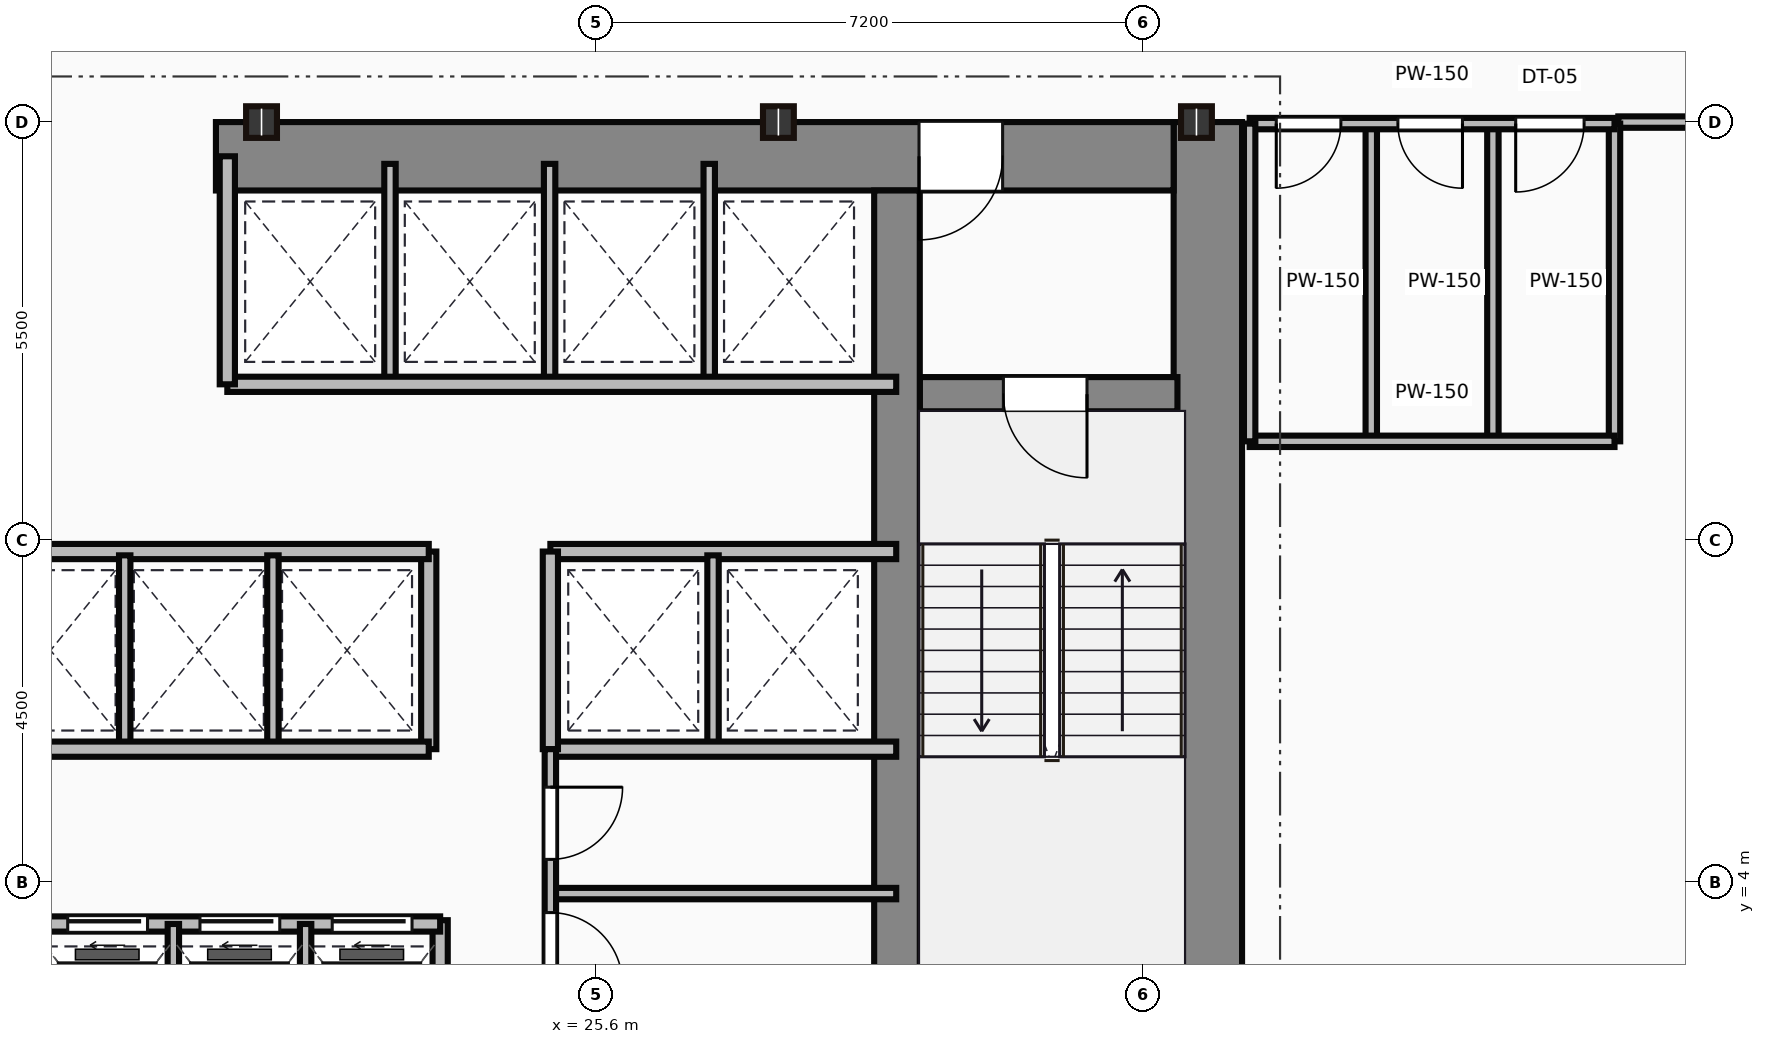
"""IFC4 building model, lengths in metres.
Left out: names, types, materials, properties, quantities, classifications, styles, units other than length and angle.
Written with IfcOpenShell. Run it as: python <this file> out.ifc"""

import sys

from ifc_helpers import new_model, si_unit, direction, frame, frame_2d, origin, origin_2d, place, context, subcontext, project, spatial, rectangle, i_section, extrude, source, transform, mapped, element, fill, save


model = new_model("IFC4")
c1 = context("Model", 3, precision=1e-05, world=origin(), true_north=direction((0.0, 1.0)))
c2 = subcontext(c1, "Body", "Model", "MODEL_VIEW")
j1 = project(units=[si_unit("LENGTHUNIT", "METRE"), si_unit("PLANEANGLEUNIT", "RADIAN")], contexts=[c1])
p1 = place(None, origin())
s1 = spatial("IfcSite", under=j1, at=p1, CompositionType="ELEMENT")
p2 = place(p1, origin())
s2 = spatial("IfcBuilding", under=s1, at=p2, CompositionType="ELEMENT")
p3 = place(p2, frame((0.0, 0.0, 47.1)))
s3 = spatial("IfcBuildingStorey", under=s2, at=p3, CompositionType="ELEMENT", Elevation=47.1)
m1 = source(origin(), c2, "Body", "SweptSolid", [
    extrude(rectangle(XDim=13.1, YDim=0.9, at=frame_2d((6.55, 0.0))), origin(), (0.0, 0.0, 1.0), 3.65),
])
p4 = place(p3, frame((33.65, 0.9, 0.0), z_axis=(0.0, 0.0, 1.0), x_axis=(0.0, 1.0, 0.0)))
e1 = element("IfcWall", 1, at=p4, inside=s3, PredefinedType="SHEAR", context=c2, shape_type="MappedRepresentation", body=[
    mapped(m1, transform((0.0, 0.0, 0.0))),
])
m2 = source(origin(), c2, "Body", "SweptSolid", [
    extrude(rectangle(XDim=12.6, YDim=0.9, at=frame_2d((6.3, 0.0))), origin(), (0.0, 0.0, 1.0), 3.65),
])
p5 = place(p3, frame((20.6, 13.55, 0.0), z_axis=(0.0, 0.0, 1.0), x_axis=(1.0, 0.0, 0.0)))
e2 = element("IfcWall", 2, at=p5, inside=s3, PredefinedType="SHEAR", context=c2, shape_type="MappedRepresentation", body=[
    mapped(m2, transform((0.0, 0.0, 0.0))),
])
p6 = place(p5, frame((9.25, 0.0, 0.0)))
e3 = element("IfcOpeningElement", 3, at=p6, cuts=e2, PredefinedType="OPENING", context=c2, shape_type="SweptSolid", body=[
    extrude(rectangle(XDim=1.1, YDim=2.15, at=frame_2d((0.55, 1.075))), frame((0.0, 0.46, 0.0), z_axis=(0.0, -1.0, 0.0), x_axis=(1.0, 0.0, 0.0)), (0.0, 0.0, 1.0), 0.92),
])
m3 = source(origin(), c2, "Body", "SweptSolid", [
    extrude(rectangle(XDim=12.2, YDim=0.6, at=frame_2d((6.1, 0.0))), origin(), (0.0, 0.0, 1.0), 3.65),
])
p7 = place(p3, frame((29.56, 0.9, 0.0), z_axis=(0.0, 0.0, 1.0), x_axis=(0.0, 1.0, 0.0)))
e4 = element("IfcWall", 4, at=p7, inside=s3, PredefinedType="SHEAR", context=c2, shape_type="MappedRepresentation", body=[
    mapped(m3, transform((0.0, 0.0, 0.0))),
])
m4 = source(origin(), c2, "Body", "SweptSolid", [
    extrude(rectangle(XDim=3.39, YDim=0.45, at=frame_2d((1.695, 0.0))), origin(), (0.0, 0.0, 1.0), 3.65),
])
p8 = place(p3, frame((29.86, 10.42, 0.0), z_axis=(0.0, 0.0, 1.0), x_axis=(1.0, 0.0, 0.0)))
e5 = element("IfcWall", 5, at=p8, inside=s3, PredefinedType="SHEAR", context=c2, shape_type="MappedRepresentation", body=[
    mapped(m4, transform((0.0, 0.0, 0.0))),
])
p9 = place(p8, frame((1.1, 0.0, 0.0)))
e6 = element("IfcOpeningElement", 6, at=p9, cuts=e5, PredefinedType="OPENING", context=c2, shape_type="SweptSolid", body=[
    extrude(rectangle(XDim=1.1, YDim=2.15, at=frame_2d((0.55, 1.075))), frame((0.0, 0.235, 0.0), z_axis=(0.0, -1.0, 0.0), x_axis=(1.0, 0.0, 0.0)), (0.0, 0.0, 1.0), 0.47),
])
m5 = source(origin(), c2, "Body", "SweptSolid", [
    extrude(i_section(OverallWidth=0.406, OverallDepth=0.416, WebThickness=0.03, FlangeThickness=0.048, at=origin_2d()), origin(), (0.0, 0.0, 1.0), 3.65),
])
for number, where, z_axis, x_axis in (
    (7, (21.2, 14.0, 0.0), (0.0, 0.0, 1.0), (1.0, 0.0, 0.0)),
    (8, (28.0, 14.0, 0.0), (0.0, 0.0, 1.0), (1.0, 0.0, 0.0)),
    (9, (33.5, 14.0, 0.0), (0.0, 0.0, 1.0), (1.0, 0.0, 0.0)),
):
    element("IfcColumn", number, at=place(p3, frame(where, z_axis=z_axis, x_axis=x_axis)), inside=s3, PredefinedType="COLUMN", context=c2, shape_type="MappedRepresentation", body=[
        mapped(m5, transform((0.0, 0.0, 0.0))),
    ])
m6 = source(origin(), c2, "Body", "SweptSolid", [
    extrude(rectangle(XDim=10.5, YDim=0.2, at=frame_2d((5.25, 0.0))), origin(), (0.0, 0.0, 1.0), 3.4),
])
p10 = place(p3, frame((13.05, 3.45, 0.0), z_axis=(0.0, 0.0, 1.0), x_axis=(1.0, 0.0, 0.0)))
e10 = element("IfcWall", 10, at=p10, inside=s3, PredefinedType="PARTITIONING", context=c2, shape_type="MappedRepresentation", body=[
    mapped(m6, transform((0.0, 0.0, 0.0))),
])
p11 = place(p10, frame((0.38, 0.0, 0.0)))
e11 = element("IfcOpeningElement", 11, at=p11, cuts=e10, PredefinedType="OPENING", context=c2, shape_type="SweptSolid", body=[
    extrude(rectangle(XDim=1.05, YDim=2.15, at=frame_2d((0.525, 1.075))), frame((0.0, 0.11, 0.0), z_axis=(0.0, -1.0, 0.0), x_axis=(1.0, 0.0, 0.0)), (0.0, 0.0, 1.0), 0.22),
])
p12 = place(p10, frame((2.12, 0.0, 0.0)))
e12 = element("IfcOpeningElement", 12, at=p12, cuts=e10, PredefinedType="OPENING", context=c2, shape_type="SweptSolid", body=[
    extrude(rectangle(XDim=1.05, YDim=2.15, at=frame_2d((0.525, 1.075))), frame((0.0, 0.11, 0.0), z_axis=(0.0, -1.0, 0.0), x_axis=(1.0, 0.0, 0.0)), (0.0, 0.0, 1.0), 0.22),
])
p13 = place(p10, frame((3.86, 0.0, 0.0)))
e13 = element("IfcOpeningElement", 13, at=p13, cuts=e10, PredefinedType="OPENING", context=c2, shape_type="SweptSolid", body=[
    extrude(rectangle(XDim=1.05, YDim=2.15, at=frame_2d((0.525, 1.075))), frame((0.0, 0.11, 0.0), z_axis=(0.0, -1.0, 0.0), x_axis=(1.0, 0.0, 0.0)), (0.0, 0.0, 1.0), 0.22),
])
p14 = place(p10, frame((5.6, 0.0, 0.0)))
e14 = element("IfcOpeningElement", 14, at=p14, cuts=e10, PredefinedType="OPENING", context=c2, shape_type="SweptSolid", body=[
    extrude(rectangle(XDim=1.05, YDim=2.15, at=frame_2d((0.525, 1.075))), frame((0.0, 0.11, 0.0), z_axis=(0.0, -1.0, 0.0), x_axis=(1.0, 0.0, 0.0)), (0.0, 0.0, 1.0), 0.22),
])
p15 = place(p10, frame((7.34, 0.0, 0.0)))
e15 = element("IfcOpeningElement", 15, at=p15, cuts=e10, PredefinedType="OPENING", context=c2, shape_type="SweptSolid", body=[
    extrude(rectangle(XDim=1.05, YDim=2.15, at=frame_2d((0.525, 1.075))), frame((0.0, 0.11, 0.0), z_axis=(0.0, -1.0, 0.0), x_axis=(1.0, 0.0, 0.0)), (0.0, 0.0, 1.0), 0.22),
])
p16 = place(p10, frame((9.08, 0.0, 0.0)))
e16 = element("IfcOpeningElement", 16, at=p16, cuts=e10, PredefinedType="OPENING", context=c2, shape_type="SweptSolid", body=[
    extrude(rectangle(XDim=1.05, YDim=2.15, at=frame_2d((0.525, 1.075))), frame((0.0, 0.11, 0.0), z_axis=(0.0, -1.0, 0.0), x_axis=(1.0, 0.0, 0.0)), (0.0, 0.0, 1.0), 0.22),
])
m7 = source(origin(), c2, "Body", "SweptSolid", [
    extrude(rectangle(XDim=2.65, YDim=0.2, at=frame_2d((1.325, 0.0))), origin(), (0.0, 0.0, 1.0), 3.4),
])
p17 = place(p3, frame((23.55, 0.85, 0.0), z_axis=(0.0, 0.0, 1.0), x_axis=(0.0, 1.0, 0.0)))
e17 = element("IfcWall", 17, at=p17, inside=s3, PredefinedType="PARTITIONING", context=c2, shape_type="MappedRepresentation", body=[
    mapped(m7, transform((0.0, 0.0, 0.0))),
])
m8 = source(origin(), c2, "Body", "SweptSolid", [
    extrude(rectangle(XDim=2.6, YDim=0.15, at=frame_2d((1.3, 0.0))), origin(), (0.0, 0.0, 1.0), 3.4),
])
for number, where, z_axis, x_axis in (
    (18, (20.04, 0.85, 0.0), (0.0, 0.0, 1.0), (0.0, 1.0, 0.0)),
    (19, (21.78, 0.85, 0.0), (0.0, 0.0, 1.0), (0.0, 1.0, 0.0)),
):
    element("IfcWall", number, at=place(p3, frame(where, z_axis=z_axis, x_axis=x_axis)), inside=s3, PredefinedType="PARTITIONING", context=c2, shape_type="MappedRepresentation", body=[
        mapped(m8, transform((0.0, 0.0, 0.0))),
    ])
m9 = source(origin(), c2, "Body", "SweptSolid", [
    extrude(rectangle(XDim=11.85, YDim=0.2, at=frame_2d((5.925, 0.0))), origin(), (0.0, 0.0, 1.0), 3.4),
])
for number, where, z_axis, x_axis in (
    (20, (11.55, 5.75, 0.0), (0.0, 0.0, 1.0), (1.0, 0.0, 0.0)),
    (21, (11.55, 8.35, 0.0), (0.0, 0.0, 1.0), (1.0, 0.0, 0.0)),
):
    element("IfcWall", number, at=place(p3, frame(where, z_axis=z_axis, x_axis=x_axis)), inside=s3, PredefinedType="PARTITIONING", context=c2, shape_type="MappedRepresentation", body=[
        mapped(m9, transform((0.0, 0.0, 0.0))),
    ])
m10 = source(origin(), c2, "Body", "SweptSolid", [
    extrude(rectangle(XDim=2.6, YDim=0.2, at=frame_2d((1.3, 0.0))), origin(), (0.0, 0.0, 1.0), 3.4),
])
p18 = place(p3, frame((23.4, 5.75, 0.0), z_axis=(0.0, 0.0, 1.0), x_axis=(0.0, 1.0, 0.0)))
e22 = element("IfcWall", 22, at=p18, inside=s3, PredefinedType="PARTITIONING", context=c2, shape_type="MappedRepresentation", body=[
    mapped(m10, transform((0.0, 0.0, 0.0))),
])
m11 = source(origin(), c2, "Body", "SweptSolid", [
    extrude(rectangle(XDim=2.5, YDim=0.15, at=frame_2d((1.25, 0.0))), origin(), (0.0, 0.0, 1.0), 3.4),
])
for number, where, z_axis, x_axis in (
    (23, (19.4, 5.8, 0.0), (0.0, 0.0, 1.0), (0.0, 1.0, 0.0)),
    (24, (21.35, 5.8, 0.0), (0.0, 0.0, 1.0), (0.0, 1.0, 0.0)),
):
    element("IfcWall", number, at=place(p3, frame(where, z_axis=z_axis, x_axis=x_axis)), inside=s3, PredefinedType="PARTITIONING", context=c2, shape_type="MappedRepresentation", body=[
        mapped(m11, transform((0.0, 0.0, 0.0))),
    ])
m12 = source(origin(), c2, "Body", "SweptSolid", [
    extrude(rectangle(XDim=8.8, YDim=0.2, at=frame_2d((4.4, 0.0))), origin(), (0.0, 0.0, 1.0), 3.4),
])
p19 = place(p3, frame((20.75, 10.55, 0.0), z_axis=(0.0, 0.0, 1.0), x_axis=(1.0, 0.0, 0.0)))
e25 = element("IfcWall", 25, at=p19, inside=s3, PredefinedType="PARTITIONING", context=c2, shape_type="MappedRepresentation", body=[
    mapped(m12, transform((0.0, 0.0, 0.0))),
])
m13 = source(origin(), c2, "Body", "SweptSolid", [
    extrude(rectangle(XDim=3.0, YDim=0.2, at=frame_2d((1.5, 0.0))), origin(), (0.0, 0.0, 1.0), 3.4),
])
p20 = place(p3, frame((20.75, 10.55, 0.0), z_axis=(0.0, 0.0, 1.0), x_axis=(0.0, 1.0, 0.0)))
e26 = element("IfcWall", 26, at=p20, inside=s3, PredefinedType="PARTITIONING", context=c2, shape_type="MappedRepresentation", body=[
    mapped(m13, transform((0.0, 0.0, 0.0))),
])
m14 = source(origin(), c2, "Body", "SweptSolid", [
    extrude(rectangle(XDim=2.85, YDim=0.15, at=frame_2d((1.425, 0.0))), origin(), (0.0, 0.0, 1.0), 3.4),
])
for number, where, z_axis, x_axis in (
    (27, (22.89, 10.6, 0.0), (0.0, 0.0, 1.0), (0.0, 1.0, 0.0)),
    (28, (24.99, 10.6, 0.0), (0.0, 0.0, 1.0), (0.0, 1.0, 0.0)),
    (29, (27.09, 10.6, 0.0), (0.0, 0.0, 1.0), (0.0, 1.0, 0.0)),
):
    element("IfcWall", number, at=place(p3, frame(where, z_axis=z_axis, x_axis=x_axis)), inside=s3, PredefinedType="PARTITIONING", context=c2, shape_type="MappedRepresentation", body=[
        mapped(m14, transform((0.0, 0.0, 0.0))),
    ])
m15 = source(origin(), c2, "Body", "SweptSolid", [
    extrude(rectangle(XDim=4.55, YDim=0.2, at=frame_2d((2.275, 0.0))), origin(), (0.0, 0.0, 1.0), 3.4),
])
for number, where, z_axis, x_axis in (
    (30, (25.0, 8.35, 0.0), (0.0, 0.0, 1.0), (1.0, 0.0, 0.0)),
    (31, (25.0, 5.75, 0.0), (0.0, 0.0, 1.0), (1.0, 0.0, 0.0)),
):
    element("IfcWall", number, at=place(p3, frame(where, z_axis=z_axis, x_axis=x_axis)), inside=s3, PredefinedType="PARTITIONING", context=c2, shape_type="MappedRepresentation", body=[
        mapped(m15, transform((0.0, 0.0, 0.0))),
    ])
p21 = place(p3, frame((25.0, 5.75, 0.0), z_axis=(0.0, 0.0, 1.0), x_axis=(0.0, 1.0, 0.0)))
e32 = element("IfcWall", 32, at=p21, inside=s3, PredefinedType="PARTITIONING", context=c2, shape_type="MappedRepresentation", body=[
    mapped(m10, transform((0.0, 0.0, 0.0))),
])
p22 = place(p3, frame((27.14, 5.8, 0.0), z_axis=(0.0, 0.0, 1.0), x_axis=(0.0, 1.0, 0.0)))
e33 = element("IfcWall", 33, at=p22, inside=s3, PredefinedType="PARTITIONING", context=c2, shape_type="MappedRepresentation", body=[
    mapped(m11, transform((0.0, 0.0, 0.0))),
])
m16 = source(origin(), c2, "Body", "SweptSolid", [
    extrude(rectangle(XDim=4.9, YDim=0.15, at=frame_2d((2.45, 0.0))), origin(), (0.0, 0.0, 1.0), 3.4),
])
p23 = place(p3, frame((25.0, 0.85, 0.0), z_axis=(0.0, 0.0, 1.0), x_axis=(0.0, 1.0, 0.0)))
e34 = element("IfcWall", 34, at=p23, inside=s3, PredefinedType="PARTITIONING", context=c2, shape_type="MappedRepresentation", body=[
    mapped(m16, transform((0.0, 0.0, 0.0))),
])
p24 = place(p23, frame((1.8, 0.0, 0.0)))
e35 = element("IfcOpeningElement", 35, at=p24, cuts=e34, PredefinedType="OPENING", context=c2, shape_type="SweptSolid", body=[
    extrude(rectangle(XDim=0.95, YDim=2.15, at=frame_2d((0.475, 1.075))), frame((0.0, 0.085, 0.0), z_axis=(0.0, -1.0, 0.0), x_axis=(1.0, 0.0, 0.0)), (0.0, 0.0, 1.0), 0.17),
])
p25 = place(p23, frame((3.45, 0.0, 0.0)))
e36 = element("IfcOpeningElement", 36, at=p25, cuts=e34, PredefinedType="OPENING", context=c2, shape_type="SweptSolid", body=[
    extrude(rectangle(XDim=0.95, YDim=2.15, at=frame_2d((0.475, 1.075))), frame((0.0, 0.085, 0.0), z_axis=(0.0, -1.0, 0.0), x_axis=(1.0, 0.0, 0.0)), (0.0, 0.0, 1.0), 0.17),
])
m17 = source(origin(), c2, "Body", "SweptSolid", [
    extrude(rectangle(XDim=4.55, YDim=0.15, at=frame_2d((2.275, 0.0))), origin(), (0.0, 0.0, 1.0), 3.4),
])
p26 = place(p3, frame((25.0, 3.85, 0.0), z_axis=(0.0, 0.0, 1.0), x_axis=(1.0, 0.0, 0.0)))
e37 = element("IfcWall", 37, at=p26, inside=s3, PredefinedType="PARTITIONING", context=c2, shape_type="MappedRepresentation", body=[
    mapped(m17, transform((0.0, 0.0, 0.0))),
])
m18 = source(origin(), c2, "Body", "SweptSolid", [
    extrude(rectangle(XDim=4.8, YDim=0.15, at=frame_2d((2.4, 0.0))), origin(), (0.0, 0.0, 1.0), 2.625),
])
p27 = place(p3, frame((34.2, 13.98, 0.0), z_axis=(0.0, 0.0, 1.0), x_axis=(1.0, 0.0, 0.0)))
e38 = element("IfcWall", 38, at=p27, inside=s3, PredefinedType="PARTITIONING", context=c2, shape_type="MappedRepresentation", body=[
    mapped(m18, transform((0.0, 0.0, 0.0))),
])
p28 = place(p27, frame((0.35, 0.0, 0.0)))
e39 = element("IfcOpeningElement", 39, at=p28, cuts=e38, PredefinedType="OPENING", context=c2, shape_type="SweptSolid", body=[
    extrude(rectangle(XDim=0.85, YDim=2.1, at=frame_2d((0.425, 1.05))), frame((0.0, 0.085, 0.0), z_axis=(0.0, -1.0, 0.0), x_axis=(1.0, 0.0, 0.0)), (0.0, 0.0, 1.0), 0.17),
])
p29 = place(p27, frame((1.95, 0.0, 0.0)))
e40 = element("IfcOpeningElement", 40, at=p29, cuts=e38, PredefinedType="OPENING", context=c2, shape_type="SweptSolid", body=[
    extrude(rectangle(XDim=0.85, YDim=2.1, at=frame_2d((0.425, 1.05))), frame((0.0, 0.085, 0.0), z_axis=(0.0, -1.0, 0.0), x_axis=(1.0, 0.0, 0.0)), (0.0, 0.0, 1.0), 0.17),
])
p30 = place(p27, frame((3.5, 0.0, 0.0)))
e41 = element("IfcOpeningElement", 41, at=p30, cuts=e38, PredefinedType="OPENING", context=c2, shape_type="SweptSolid", body=[
    extrude(rectangle(XDim=0.9, YDim=2.1, at=frame_2d((0.45, 1.05))), frame((0.0, 0.085, 0.0), z_axis=(0.0, -1.0, 0.0), x_axis=(1.0, 0.0, 0.0)), (0.0, 0.0, 1.0), 0.17),
])
m19 = source(origin(), c2, "Body", "SweptSolid", [
    extrude(rectangle(XDim=4.8, YDim=0.15, at=frame_2d((2.4, 0.0))), origin(), (0.0, 0.0, 1.0), 3.4),
])
p31 = place(p3, frame((34.2, 9.8, 0.0), z_axis=(0.0, 0.0, 1.0), x_axis=(1.0, 0.0, 0.0)))
e42 = element("IfcWall", 42, at=p31, inside=s3, PredefinedType="PARTITIONING", context=c2, shape_type="MappedRepresentation", body=[
    mapped(m19, transform((0.0, 0.0, 0.0))),
])
m20 = source(origin(), c2, "Body", "SweptSolid", [
    extrude(rectangle(XDim=4.18, YDim=0.15, at=frame_2d((2.09, 0.0))), origin(), (0.0, 0.0, 1.0), 3.4),
])
for number, where, z_axis, x_axis in (
    (43, (39.0, 9.8, 0.0), (0.0, 0.0, 1.0), (0.0, 1.0, 0.0)),
    (44, (34.2, 9.8, 0.0), (0.0, 0.0, 1.0), (0.0, 1.0, 0.0)),
    (45, (35.8, 9.8, 0.0), (0.0, 0.0, 1.0), (0.0, 1.0, 0.0)),
    (46, (37.4, 9.8, 0.0), (0.0, 0.0, 1.0), (0.0, 1.0, 0.0)),
):
    element("IfcWall", number, at=place(p3, frame(where, z_axis=z_axis, x_axis=x_axis)), inside=s3, PredefinedType="PARTITIONING", context=c2, shape_type="MappedRepresentation", body=[
        mapped(m20, transform((0.0, 0.0, 0.0))),
    ])
m21 = source(origin(), c2, "Body", "SweptSolid", [
    extrude(rectangle(XDim=7.75, YDim=0.15, at=frame_2d((3.875, 0.0))), origin(), (0.0, 0.0, 1.0), 2.625),
])
p32 = place(p3, frame((46.8, 14.0, 0.0), z_axis=(0.0, 0.0, 1.0), x_axis=(-1.0, 0.0, 0.0)))
e47 = element("IfcWall", 47, at=p32, inside=s3, PredefinedType="PARTITIONING", context=c2, shape_type="MappedRepresentation", body=[
    mapped(m21, transform((0.0, 0.0, 0.0))),
])
m22 = source(origin(), c2, "Body", "SweptSolid", [
    extrude(rectangle(XDim=1.1, YDim=2.15, at=frame_2d((0.55, 1.075))), frame((0.0, 0.025, 0.0), z_axis=(0.0, -1.0, 0.0), x_axis=(1.0, 0.0, 0.0)), (0.0, 0.0, 1.0), 0.05),
])
p33 = place(p9, frame((1.1, 0.0, 0.0), z_axis=(0.0, 0.0, 1.0), x_axis=(-1.0, 0.0, 0.0)))
e48 = element("IfcDoor", 48, at=p33, inside=s3, OperationType="SINGLE_SWING_RIGHT", PredefinedType="DOOR", context=c2, shape_type="MappedRepresentation", body=[
    mapped(m22, transform((0.0, 0.0, 0.0))),
])
fill(e6, e48)
p34 = place(p6, origin())
e49 = element("IfcDoor", 49, at=p34, inside=s3, OperationType="SINGLE_SWING_LEFT", PredefinedType="DOOR", context=c2, shape_type="MappedRepresentation", body=[
    mapped(m22, transform((0.0, 0.0, 0.0))),
])
fill(e3, e49)
m23 = source(origin(), c2, "Body", "SweptSolid", [
    extrude(rectangle(XDim=1.05, YDim=2.15, at=frame_2d((0.525, 1.075))), frame((0.0, 0.025, 0.0), z_axis=(0.0, -1.0, 0.0), x_axis=(1.0, 0.0, 0.0)), (0.0, 0.0, 1.0), 0.05),
])
p35 = place(p14, origin())
e50 = element("IfcDoor", 50, at=p35, inside=s3, OperationType="SLIDING_TO_LEFT", PredefinedType="DOOR", context=c2, shape_type="MappedRepresentation", body=[
    mapped(m23, transform((0.0, 0.0, 0.0))),
])
fill(e14, e50)
p36 = place(p15, origin())
e51 = element("IfcDoor", 51, at=p36, inside=s3, OperationType="SLIDING_TO_LEFT", PredefinedType="DOOR", context=c2, shape_type="MappedRepresentation", body=[
    mapped(m23, transform((0.0, 0.0, 0.0))),
])
fill(e15, e51)
p37 = place(p16, origin())
e52 = element("IfcDoor", 52, at=p37, inside=s3, OperationType="SLIDING_TO_LEFT", PredefinedType="DOOR", context=c2, shape_type="MappedRepresentation", body=[
    mapped(m23, transform((0.0, 0.0, 0.0))),
])
fill(e16, e52)
m24 = source(origin(), c2, "Body", "SweptSolid", [
    extrude(rectangle(XDim=0.95, YDim=2.15, at=frame_2d((0.475, 1.075))), frame((0.0, 0.025, 0.0), z_axis=(0.0, -1.0, 0.0), x_axis=(1.0, 0.0, 0.0)), (0.0, 0.0, 1.0), 0.05),
])
p38 = place(p24, origin())
e53 = element("IfcDoor", 53, at=p38, inside=s3, OperationType="SINGLE_SWING_LEFT", PredefinedType="DOOR", context=c2, shape_type="MappedRepresentation", body=[
    mapped(m24, transform((0.0, 0.0, 0.0))),
])
fill(e35, e53)
p39 = place(p25, origin())
e54 = element("IfcDoor", 54, at=p39, inside=s3, OperationType="SINGLE_SWING_RIGHT", PredefinedType="DOOR", context=c2, shape_type="MappedRepresentation", body=[
    mapped(m24, transform((0.0, 0.0, 0.0))),
])
fill(e36, e54)
m25 = source(origin(), c2, "Body", "SweptSolid", [
    extrude(rectangle(XDim=0.85, YDim=2.1, at=frame_2d((0.425, 1.05))), frame((0.0, 0.025, 0.0), z_axis=(0.0, -1.0, 0.0), x_axis=(1.0, 0.0, 0.0)), (0.0, 0.0, 1.0), 0.05),
])
p40 = place(p28, frame((0.85, 0.0, 0.0), z_axis=(0.0, 0.0, 1.0), x_axis=(-1.0, 0.0, 0.0)))
e55 = element("IfcDoor", 55, at=p40, inside=s3, OperationType="SINGLE_SWING_LEFT", PredefinedType="DOOR", context=c2, shape_type="MappedRepresentation", body=[
    mapped(m25, transform((0.0, 0.0, 0.0))),
])
fill(e39, e55)
p41 = place(p29, frame((0.85, 0.0, 0.0), z_axis=(0.0, 0.0, 1.0), x_axis=(-1.0, 0.0, 0.0)))
e56 = element("IfcDoor", 56, at=p41, inside=s3, OperationType="SINGLE_SWING_RIGHT", PredefinedType="DOOR", context=c2, shape_type="MappedRepresentation", body=[
    mapped(m25, transform((0.0, 0.0, 0.0))),
])
fill(e40, e56)
m26 = source(origin(), c2, "Body", "SweptSolid", [
    extrude(rectangle(XDim=0.9, YDim=2.1, at=frame_2d((0.45, 1.05))), frame((0.0, 0.025, 0.0), z_axis=(0.0, -1.0, 0.0), x_axis=(1.0, 0.0, 0.0)), (0.0, 0.0, 1.0), 0.05),
])
p42 = place(p30, frame((0.9, 0.0, 0.0), z_axis=(0.0, 0.0, 1.0), x_axis=(-1.0, 0.0, 0.0)))
e57 = element("IfcDoor", 57, at=p42, inside=s3, OperationType="SINGLE_SWING_LEFT", PredefinedType="DOOR", context=c2, shape_type="MappedRepresentation", body=[
    mapped(m26, transform((0.0, 0.0, 0.0))),
])
fill(e41, e57)
save(model, sys.argv[1])
